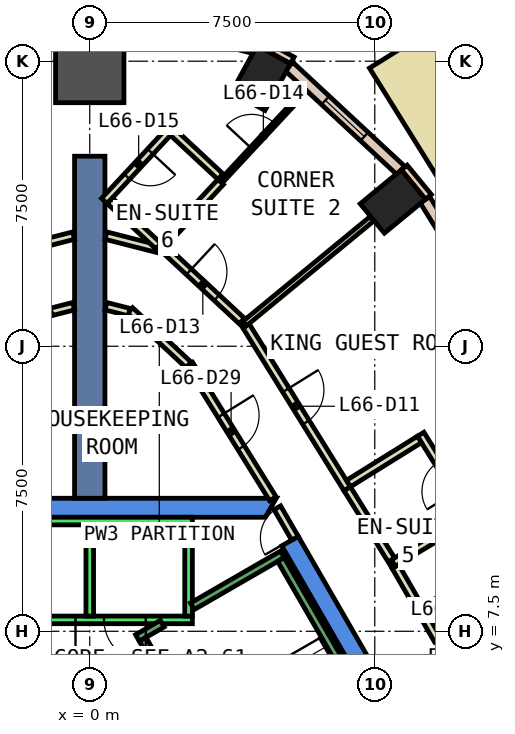
"""IFC4 building model, lengths in metres.
Left out: names, types, materials, properties, quantities, classifications, styles, units other than length and angle.
Written with IfcOpenShell. Run it as: python <this file> out.ifc"""

import sys

from ifc_helpers import new_model, si_unit, direction, frame, frame_2d, origin, origin_2d, place, context, subcontext, project, spatial, polyline, rectangle, outline, extrude, element, fill, save


model = new_model("IFC4")
c1 = context("Model", 3, precision=1e-05, world=origin(), true_north=direction((0.0, 1.0)))
c2 = subcontext(c1, "Body", "Model", "MODEL_VIEW")
j1 = project(units=[si_unit("LENGTHUNIT", "METRE"), si_unit("PLANEANGLEUNIT", "RADIAN")], contexts=[c1])
p1 = place(None, origin())
s1 = spatial("IfcSite", under=j1, at=p1, CompositionType="ELEMENT")
p2 = place(p1, origin())
s2 = spatial("IfcBuilding", under=s1, at=p2, CompositionType="ELEMENT")
p3 = place(p2, frame((0.0, 0.0, 286.4)))
s3 = spatial("IfcBuildingStorey", under=s2, at=p3, CompositionType="ELEMENT", Elevation=286.4)
for number, where, z_axis, x_axis in (
    (1, (7.975, 18.807, 0.0), (0.0, 0.0, 1.0), (-0.636, 0.772, 0.0)),
    (2, (4.507, 22.059, 0.0), (0.0, 0.0, 1.0), (-0.878, 0.479, 0.0)),
):
    element("IfcColumn", number, at=place(p3, frame(where, z_axis=z_axis, x_axis=x_axis)), inside=s3, PredefinedType="COLUMN", context=c2, shape_type="SweptSolid", body=[
        extrude(rectangle(XDim=1.0, YDim=1.4, at=origin_2d()), origin(), (0.0, 0.0, 1.0), 3.26),
    ])
p4 = place(p3, frame((0.0, 22.308, 0.0), z_axis=(0.0, 0.0, 1.0), x_axis=(0.0, 1.0, 0.0)))
e3 = element("IfcColumn", 3, at=p4, inside=s3, PredefinedType="COLUMN", context=c2, shape_type="SweptSolid", body=[
    extrude(rectangle(XDim=1.8, YDim=1.8, at=origin_2d()), origin(), (0.0, 0.0, 1.0), 3.26),
])
p5 = place(p3, frame((0.0, 0.0, -0.6)))
e4 = element("IfcWall", 4, at=p5, inside=s3, PredefinedType="SHEAR", context=c2, shape_type="SweptSolid", body=[
    extrude(outline(polyline([(5.486, 9.998), (5.053, 9.748), (9.238, 2.5), (9.815, 2.5), (5.486, 9.998)])), origin(), (0.0, 0.0, 1.0), 3.86),
])
p6 = place(p3, frame((0.0, 0.0, -0.6)))
e5 = element("IfcWall", 5, at=p6, inside=s3, PredefinedType="SHEAR", context=c2, shape_type="SweptSolid", body=[
    extrude(outline(polyline([(4.907, 11.0), (-4.907, 11.0), (-4.619, 10.5), (4.619, 10.5), (4.907, 11.0)])), origin(), (0.0, 0.0, 1.0), 3.86),
])
p7 = place(p3, frame((0.0, 11.0, -0.6), z_axis=(0.0, 0.0, 1.0), x_axis=(0.0, 1.0, 0.0)))
e6 = element("IfcWall", 6, at=p7, inside=s3, PredefinedType="SHEAR", context=c2, shape_type="SweptSolid", body=[
    extrude(rectangle(XDim=9.0, YDim=0.8, at=frame_2d((4.5, 0.0))), origin(), (0.0, 0.0, 1.0), 3.86),
])
for number, where, z_axis, x_axis in (
    (7, (5.329, 22.522, 0.0), (0.0, 0.0, 1.0), (-0.878, 0.479, 0.0)),
    (8, (8.911, 18.929, 0.0), (0.0, 0.0, 1.0), (-0.636, 0.772, 0.0)),
):
    element("IfcWall", number, at=place(p3, frame(where, z_axis=z_axis, x_axis=x_axis)), inside=s3, PredefinedType="STANDARD", context=c2, shape_type="SweptSolid", body=[
        extrude(rectangle(XDim=1.0, YDim=0.2, at=frame_2d((0.5, 0.0))), origin(), (0.0, 0.0, 1.0), 3.26),
    ])
p8 = place(p3, frame((12.659, 12.675, 0.0), z_axis=(0.0, 0.0, 1.0), x_axis=(-0.527762071678, 0.849392250788, 0.0)))
e9 = element("IfcWall", 9, at=p8, inside=s3, PredefinedType="STANDARD", context=c2, shape_type="SweptSolid", body=[
    extrude(rectangle(XDim=7.276, YDim=0.3, at=frame_2d((3.638, 0.0))), origin(), (0.0, 0.0, 1.0), 3.26),
])
p9 = place(p8, frame((0.719, 0.0, 0.9)))
e10 = element("IfcOpeningElement", 10, at=p9, cuts=e9, PredefinedType="OPENING", context=c2, shape_type="SweptSolid", body=[
    extrude(rectangle(XDim=2.2, YDim=2.0, at=frame_2d((1.1, 1.0))), frame((0.0, 0.16, 0.0), z_axis=(0.0, -1.0, 0.0), x_axis=(1.0, 0.0, 0.0)), (0.0, 0.0, 1.0), 0.32),
])
p10 = place(p8, frame((4.357, 0.0, 0.9)))
e11 = element("IfcOpeningElement", 11, at=p10, cuts=e9, PredefinedType="OPENING", context=c2, shape_type="SweptSolid", body=[
    extrude(rectangle(XDim=2.2, YDim=2.0, at=frame_2d((1.1, 1.0))), frame((0.0, 0.16, 0.0), z_axis=(0.0, -1.0, 0.0), x_axis=(1.0, 0.0, 0.0)), (0.0, 0.0, 1.0), 0.32),
])
p11 = place(p3, frame((8.184, 19.626, 0.0), z_axis=(0.0, 0.0, 1.0), x_axis=(-0.732397380344, 0.680877431896, 0.0)))
e12 = element("IfcWall", 12, at=p11, inside=s3, PredefinedType="STANDARD", context=c2, shape_type="SweptSolid", body=[
    extrude(rectangle(XDim=4.019, YDim=0.3, at=frame_2d((2.009, 0.0))), origin(), (0.0, 0.0, 1.0), 3.26),
])
p12 = place(p11, frame((1.309, 0.0, 0.9)))
e13 = element("IfcOpeningElement", 13, at=p12, cuts=e12, PredefinedType="OPENING", context=c2, shape_type="SweptSolid", body=[
    extrude(rectangle(XDim=1.4, YDim=2.0, at=frame_2d((0.7, 1.0))), frame((0.0, 0.16, 0.0), z_axis=(0.0, -1.0, 0.0), x_axis=(1.0, 0.0, 0.0)), (0.0, 0.0, 1.0), 0.32),
])
p13 = place(p3, frame((4.365, 22.84, 0.0), z_axis=(0.0, 0.0, 1.0), x_axis=(-0.968979290476, 0.247141932156, 0.0)))
e14 = element("IfcWall", 14, at=p13, inside=s3, PredefinedType="STANDARD", context=c2, shape_type="SweptSolid", body=[
    extrude(rectangle(XDim=3.577, YDim=0.3, at=frame_2d((1.789, 0.0))), origin(), (0.0, 0.0, 1.0), 3.26),
])
p14 = place(p13, frame((1.088, 0.0, 0.9)))
e15 = element("IfcOpeningElement", 15, at=p14, cuts=e14, PredefinedType="OPENING", context=c2, shape_type="SweptSolid", body=[
    extrude(rectangle(XDim=1.4, YDim=2.0, at=frame_2d((0.7, 1.0))), frame((0.0, 0.16, 0.0), z_axis=(0.0, -1.0, 0.0), x_axis=(1.0, 0.0, 0.0)), (0.0, 0.0, 1.0), 0.32),
])
p15 = place(p3, frame((-0.899, 23.724, 0.0), z_axis=(0.0, 0.0, 1.0), x_axis=(-0.968979290476, -0.247141932156, 0.0)))
e16 = element("IfcWall", 16, at=p15, inside=s3, PredefinedType="STANDARD", context=c2, shape_type="SweptSolid", body=[
    extrude(rectangle(XDim=3.577, YDim=0.3, at=frame_2d((1.789, 0.0))), origin(), (0.0, 0.0, 1.0), 3.26),
])
p16 = place(p15, frame((1.088, 0.0, 0.9)))
e17 = element("IfcOpeningElement", 17, at=p16, cuts=e16, PredefinedType="OPENING", context=c2, shape_type="SweptSolid", body=[
    extrude(rectangle(XDim=1.4, YDim=2.0, at=frame_2d((0.7, 1.0))), frame((0.0, 0.16, 0.0), z_axis=(0.0, -1.0, 0.0), x_axis=(1.0, 0.0, 0.0)), (0.0, 0.0, 1.0), 0.32),
])
p17 = place(p3, frame((10.704, 18.747, 0.0), z_axis=(0.0, 0.0, 1.0), x_axis=(-0.528631074262, 0.848851687472, 0.0)))
e18 = element("IfcWall", 18, at=p17, inside=s3, PredefinedType="STANDARD", context=c2, shape_type="SweptSolid", body=[
    extrude(rectangle(XDim=4.799, YDim=1.9, at=frame_2d((2.4, 0.0))), origin(), (0.0, 0.0, 1.0), 0.8),
])
p18 = place(p3, frame((2.62, 14.526, 0.0), z_axis=(0.0, 0.0, 1.0), x_axis=(0.527726136463, -0.84941457775, 0.0)))
e19 = element("IfcWall", 19, at=p18, inside=s3, PredefinedType="PARTITIONING", context=c2, shape_type="SweptSolid", body=[
    extrude(rectangle(XDim=4.165, YDim=0.2, at=frame_2d((2.083, 0.0))), origin(), (0.0, 0.0, 1.0), 2.4),
])
p19 = place(p18, frame((1.583, 0.0, 0.0)))
e20 = element("IfcOpeningElement", 20, at=p19, cuts=e19, PredefinedType="OPENING", context=c2, shape_type="SweptSolid", body=[
    extrude(rectangle(XDim=1.0, YDim=2.1, at=frame_2d((0.5, 1.05))), frame((0.0, 0.11, 0.0), z_axis=(0.0, -1.0, 0.0), x_axis=(1.0, 0.0, 0.0)), (0.0, 0.0, 1.0), 0.22),
])
p20 = place(p3, frame((2.6, 14.509, 0.0), z_axis=(0.0, 0.0, 1.0), x_axis=(-0.732355024595, 0.680922989735, 0.0)))
e21 = element("IfcWall", 21, at=p20, inside=s3, PredefinedType="PARTITIONING", context=c2, shape_type="SweptSolid", body=[
    extrude(rectangle(XDim=2.103, YDim=0.2, at=frame_2d((1.051, 0.0))), origin(), (0.0, 0.0, 1.0), 3.26),
])
for number, where, z_axis, x_axis in (
    (22, (1.036, 15.898, 0.0), (0.0, 0.0, 1.0), (-0.969, 0.247, 0.0)),
    (23, (-0.425, 16.054, 0.0), (0.0, 0.0, 1.0), (-0.969, -0.247, 0.0)),
):
    element("IfcWall", number, at=place(p3, frame(where, z_axis=z_axis, x_axis=x_axis)), inside=s3, PredefinedType="PARTITIONING", context=c2, shape_type="SweptSolid", body=[
        extrude(rectangle(XDim=0.63, YDim=0.2, at=frame_2d((0.315, 0.0))), origin(), (0.0, 0.0, 1.0), 3.26),
    ])
p21 = place(p3, frame((-1.06, 15.941, 0.0), z_axis=(0.0, 0.0, 1.0), x_axis=(-0.732355024595, -0.680922989735, 0.0)))
e24 = element("IfcWall", 24, at=p21, inside=s3, PredefinedType="PARTITIONING", context=c2, shape_type="SweptSolid", body=[
    extrude(rectangle(XDim=2.103, YDim=0.2, at=frame_2d((1.051, 0.0))), origin(), (0.0, 0.0, 1.0), 3.26),
])
p22 = place(p3, frame((8.039, 9.209, 0.0), z_axis=(0.0, 0.0, 1.0), x_axis=(0.500219543227, -0.865898613334, 0.0)))
e25 = element("IfcWall", 25, at=p22, inside=s3, PredefinedType="PARTITIONING", context=c2, shape_type="SweptSolid", body=[
    extrude(rectangle(XDim=1.261, YDim=0.2, at=frame_2d((0.631, 0.0))), origin(), (0.0, 0.0, 1.0), 3.26),
])
p23 = place(p3, frame((8.67, 8.117, 0.0), z_axis=(0.0, 0.0, 1.0), x_axis=(0.50002537861, -0.866010750942, 0.0)))
e26 = element("IfcWall", 26, at=p23, inside=s3, PredefinedType="PARTITIONING", context=c2, shape_type="SweptSolid", body=[
    extrude(rectangle(XDim=3.0, YDim=0.2, at=frame_2d((1.5, 0.0))), origin(), (0.0, 0.0, 1.0), 3.26),
])
p24 = place(p3, frame((4.022, 15.68, 0.0), z_axis=(0.0, 0.0, 1.0), x_axis=(0.527737948498, -0.849407239029, 0.0)))
e27 = element("IfcWall", 27, at=p24, inside=s3, PredefinedType="PARTITIONING", context=c2, shape_type="SweptSolid", body=[
    extrude(rectangle(XDim=5.217, YDim=0.2, at=frame_2d((2.608, 0.0))), origin(), (0.0, 0.0, 1.0), 3.26),
])
p25 = place(p24, frame((2.159, 0.0, 0.0)))
e28 = element("IfcOpeningElement", 28, at=p25, cuts=e27, PredefinedType="OPENING", context=c2, shape_type="SweptSolid", body=[
    extrude(rectangle(XDim=1.0, YDim=2.1, at=frame_2d((0.5, 1.05))), frame((0.0, 0.11, 0.0), z_axis=(0.0, -1.0, 0.0), x_axis=(1.0, 0.0, 0.0)), (0.0, 0.0, 1.0), 0.22),
])
p26 = place(p3, frame((6.775, 11.249, 0.0), z_axis=(0.0, 0.0, 1.0), x_axis=(0.527803270752, -0.849366650736, 0.0)))
e29 = element("IfcWall", 29, at=p26, inside=s3, PredefinedType="PARTITIONING", context=c2, shape_type="SweptSolid", body=[
    extrude(rectangle(XDim=2.401, YDim=0.2, at=frame_2d((1.2, 0.0))), origin(), (0.0, 0.0, 1.0), 3.26),
])
p27 = place(p3, frame((1.949, 17.572, 0.0), z_axis=(0.0, 0.0, 1.0), x_axis=(0.732331154554, -0.680948661846, 0.0)))
e30 = element("IfcWall", 30, at=p27, inside=s3, PredefinedType="PARTITIONING", context=c2, shape_type="SweptSolid", body=[
    extrude(rectangle(XDim=2.803, YDim=0.2, at=frame_2d((1.402, 0.0))), origin(), (0.0, 0.0, 1.0), 3.26),
])
p28 = place(p27, frame((0.901, 0.0, 0.0)))
e31 = element("IfcOpeningElement", 31, at=p28, cuts=e30, PredefinedType="OPENING", context=c2, shape_type="SweptSolid", body=[
    extrude(rectangle(XDim=1.0, YDim=2.1, at=frame_2d((0.5, 1.05))), frame((0.0, 0.11, 0.0), z_axis=(0.0, -1.0, 0.0), x_axis=(1.0, 0.0, 0.0)), (0.0, 0.0, 1.0), 0.22),
])
p29 = place(p3, frame((-1.926, 17.528, 0.0), z_axis=(0.0, 0.0, 1.0), x_axis=(0.968981980879, 0.247131383542, 0.0)))
e32 = element("IfcWall", 32, at=p29, inside=s3, PredefinedType="PARTITIONING", context=c2, shape_type="SweptSolid", body=[
    extrude(rectangle(XDim=1.549, YDim=0.2, at=frame_2d((0.774, 0.0))), origin(), (0.0, 0.0, 1.0), 3.26),
])
p30 = place(p3, frame((0.425, 17.911, 0.0), z_axis=(0.0, 0.0, 1.0), x_axis=(0.969051069597, -0.246860334023, 0.0)))
e33 = element("IfcWall", 33, at=p30, inside=s3, PredefinedType="PARTITIONING", context=c2, shape_type="SweptSolid", body=[
    extrude(rectangle(XDim=1.474, YDim=0.2, at=frame_2d((0.737, 0.0))), origin(), (0.0, 0.0, 1.0), 3.26),
])
p31 = place(p3, frame((10.885, 9.28, 0.0), z_axis=(0.0, 0.0, 1.0), x_axis=(-0.866022959057, -0.500004234368, 0.0)))
e34 = element("IfcWall", 34, at=p31, inside=s3, PredefinedType="PARTITIONING", context=c2, shape_type="SweptSolid", body=[
    extrude(rectangle(XDim=2.5, YDim=0.2, at=frame_2d((1.25, 0.0))), origin(), (0.0, 0.0, 1.0), 3.26),
])
p32 = place(p3, frame((7.989, 9.295, 0.0), z_axis=(0.0, 0.0, 1.0), x_axis=(0.857801856135, 0.513980520654, 0.0)))
e35 = element("IfcWall", 35, at=p32, inside=s3, PredefinedType="PARTITIONING", context=c2, shape_type="SweptSolid", body=[
    extrude(rectangle(XDim=2.3, YDim=0.2, at=frame_2d((1.15, 0.0))), origin(), (0.0, 0.0, 1.0), 3.26),
])
p33 = place(p3, frame((10.1, 10.443, 0.0), z_axis=(0.0, 0.0, 1.0), x_axis=(-0.527510239672, 0.849548672555, 0.0)))
e36 = element("IfcWall", 36, at=p33, inside=s3, PredefinedType="PARTITIONING", context=c2, shape_type="SweptSolid", body=[
    extrude(rectangle(XDim=2.639, YDim=0.2, at=frame_2d((1.319, 0.0))), origin(), (0.0, 0.0, 1.0), 3.26),
])
p34 = place(p33, frame((0.869, 0.0, 0.0)))
e37 = element("IfcOpeningElement", 37, at=p34, cuts=e36, PredefinedType="OPENING", context=c2, shape_type="SweptSolid", body=[
    extrude(rectangle(XDim=0.9, YDim=2.1, at=frame_2d((0.45, 1.05))), frame((0.0, 0.11, 0.0), z_axis=(0.0, -1.0, 0.0), x_axis=(1.0, 0.0, 0.0)), (0.0, 0.0, 1.0), 0.22),
])
p35 = place(p3, frame((8.676, 12.548, 0.0), z_axis=(0.0, 0.0, 1.0), x_axis=(-0.849286670427, -0.527931957202, 0.0)))
e38 = element("IfcWall", 38, at=p35, inside=s3, PredefinedType="PARTITIONING", context=c2, shape_type="SweptSolid", body=[
    extrude(rectangle(XDim=2.199, YDim=0.2, at=frame_2d((1.1, 0.0))), origin(), (0.0, 0.0, 1.0), 3.26),
])
p36 = place(p3, frame((4.075, 15.595, 0.0), z_axis=(0.0, 0.0, 1.0), x_axis=(0.771899326406, 0.635744783616, 0.0)))
e39 = element("IfcWall", 39, at=p36, inside=s3, PredefinedType="PARTITIONING", context=c2, shape_type="SweptSolid", body=[
    extrude(rectangle(XDim=4.332, YDim=0.15, at=frame_2d((2.166, 0.0))), origin(), (0.0, 0.0, 1.0), 3.26),
])
p37 = place(p3, frame((3.444, 19.322, 0.0), z_axis=(0.0, 0.0, 1.0), x_axis=(0.68085394361, 0.732419215662, 0.0)))
e40 = element("IfcWall", 40, at=p37, inside=s3, PredefinedType="PARTITIONING", context=c2, shape_type="SweptSolid", body=[
    extrude(rectangle(XDim=3.3, YDim=0.1, at=frame_2d((1.65, 0.0))), origin(), (0.0, 0.0, 1.0), 3.26),
])
p38 = place(p37, frame((1.2, 0.0, 0.0)))
e41 = element("IfcOpeningElement", 41, at=p38, cuts=e40, PredefinedType="OPENING", context=c2, shape_type="SweptSolid", body=[
    extrude(rectangle(XDim=0.9, YDim=2.1, at=frame_2d((0.45, 1.05))), frame((0.0, 0.06, 0.0), z_axis=(0.0, -1.0, 0.0), x_axis=(1.0, 0.0, 0.0)), (0.0, 0.0, 1.0), 0.12),
])
p39 = place(p3, frame((1.776, 17.528, 0.0), z_axis=(0.0, 0.0, 1.0), x_axis=(0.680978439741, 0.732303464834, 0.0)))
e42 = element("IfcWall", 42, at=p39, inside=s3, PredefinedType="PARTITIONING", context=c2, shape_type="SweptSolid", body=[
    extrude(rectangle(XDim=2.45, YDim=0.2, at=frame_2d((1.225, 0.0))), origin(), (0.0, 0.0, 1.0), 3.26),
])
p40 = place(p3, frame((3.439, 19.464, 0.0), z_axis=(0.0, 0.0, 1.0), x_axis=(-0.732491549411, 0.68077612329, 0.0)))
e43 = element("IfcWall", 43, at=p40, inside=s3, PredefinedType="PARTITIONING", context=c2, shape_type="SweptSolid", body=[
    extrude(rectangle(XDim=1.699, YDim=0.2, at=frame_2d((0.85, 0.0))), origin(), (0.0, 0.0, 1.0), 3.26),
])
p41 = place(p3, frame((2.189, 20.763, 0.0), z_axis=(0.0, 0.0, 1.0), x_axis=(-0.680987945319, -0.73229462536, 0.0)))
e44 = element("IfcWall", 44, at=p41, inside=s3, PredefinedType="PARTITIONING", context=c2, shape_type="SweptSolid", body=[
    extrude(rectangle(XDim=2.65, YDim=0.2, at=frame_2d((1.325, 0.0))), origin(), (0.0, 0.0, 1.0), 3.26),
])
p42 = place(p41, frame((0.875, 0.0, 0.0)))
e45 = element("IfcOpeningElement", 45, at=p42, cuts=e44, PredefinedType="OPENING", context=c2, shape_type="SweptSolid", body=[
    extrude(rectangle(XDim=0.9, YDim=2.1, at=frame_2d((0.45, 1.05))), frame((0.0, 0.11, 0.0), z_axis=(0.0, -1.0, 0.0), x_axis=(1.0, 0.0, 0.0)), (0.0, 0.0, 1.0), 0.22),
])
p43 = place(p3, frame((0.526, 18.827, 0.0), z_axis=(0.0, 0.0, 1.0), x_axis=(0.732112296378, -0.681183958628, 0.0)))
e46 = element("IfcWall", 46, at=p43, inside=s3, PredefinedType="PARTITIONING", context=c2, shape_type="SweptSolid", body=[
    extrude(rectangle(XDim=1.75, YDim=0.2, at=frame_2d((0.875, 0.0))), origin(), (0.0, 0.0, 1.0), 3.26),
])
p44 = place(p3, frame((5.399, 9.948, 0.0), z_axis=(0.0, 0.0, 1.0), x_axis=(-0.499882215713, 0.866093395895, 0.0)))
e47 = element("IfcWall", 47, at=p44, inside=s3, PredefinedType="PARTITIONING", context=c2, shape_type="SweptSolid", body=[
    extrude(rectangle(XDim=0.926, YDim=0.2, at=frame_2d((0.463, 0.0))), origin(), (0.0, 0.0, 1.0), 2.4),
])
p45 = place(p44, frame((0.017, 0.0, 0.0)))
e48 = element("IfcOpeningElement", 48, at=p45, cuts=e47, PredefinedType="OPENING", context=c2, shape_type="SweptSolid", body=[
    extrude(rectangle(XDim=0.9, YDim=2.1, at=frame_2d((0.45, 1.05))), frame((0.0, 0.11, 0.0), z_axis=(0.0, -1.0, 0.0), x_axis=(1.0, 0.0, 0.0)), (0.0, 0.0, 1.0), 0.22),
])
p46 = place(p3, frame((2.7, 7.8, 0.0), z_axis=(0.0, 0.0, 1.0), x_axis=(-1.0, 0.0, 0.0)))
e49 = element("IfcWall", 49, at=p46, inside=s3, PredefinedType="STANDARD", context=c2, shape_type="SweptSolid", body=[
    extrude(rectangle(XDim=5.4, YDim=0.2, at=frame_2d((2.7, 0.0))), origin(), (0.0, 0.0, 1.0), 3.26),
])
p47 = place(p46, frame((1.225, 0.0, 0.0)))
e50 = element("IfcOpeningElement", 50, at=p47, cuts=e49, PredefinedType="OPENING", context=c2, shape_type="SweptSolid", body=[
    extrude(rectangle(XDim=1.1, YDim=2.1, at=frame_2d((0.55, 1.05))), frame((0.0, 0.11, 0.0), z_axis=(0.0, -1.0, 0.0), x_axis=(1.0, 0.0, 0.0)), (0.0, 0.0, 1.0), 0.22),
])
p48 = place(p46, frame((3.075, 0.0, 0.0)))
e51 = element("IfcOpeningElement", 51, at=p48, cuts=e49, PredefinedType="OPENING", context=c2, shape_type="SweptSolid", body=[
    extrude(rectangle(XDim=1.1, YDim=2.1, at=frame_2d((0.55, 1.05))), frame((0.0, 0.11, 0.0), z_axis=(0.0, -1.0, 0.0), x_axis=(1.0, 0.0, 0.0)), (0.0, 0.0, 1.0), 0.22),
])
p49 = place(p3, frame((2.7, 10.4, 0.0), z_axis=(0.0, 0.0, 1.0), x_axis=(-1.0, 0.0, 0.0)))
e52 = element("IfcWall", 52, at=p49, inside=s3, PredefinedType="STANDARD", context=c2, shape_type="SweptSolid", body=[
    extrude(rectangle(XDim=5.4, YDim=0.2, at=frame_2d((2.7, 0.0))), origin(), (0.0, 0.0, 1.0), 3.26),
])
for number, where, z_axis, x_axis in (
    (53, (2.6, 7.9, 0.0), (0.0, 0.0, 1.0), (0.0, 1.0, 0.0)),
    (54, (0.0, 7.9, 0.0), (0.0, 0.0, 1.0), (0.0, 1.0, 0.0)),
):
    element("IfcWall", number, at=place(p3, frame(where, z_axis=z_axis, x_axis=x_axis)), inside=s3, PredefinedType="STANDARD", context=c2, shape_type="SweptSolid", body=[
        extrude(rectangle(XDim=2.4, YDim=0.2, at=frame_2d((1.2, 0.0))), origin(), (0.0, 0.0, 1.0), 3.26),
    ])
p50 = place(p3, frame((2.7, 8.158, 0.0), z_axis=(0.0, 0.0, 1.0), x_axis=(0.86611865017, 0.499838457731, 0.0)))
e55 = element("IfcWall", 55, at=p50, inside=s3, PredefinedType="STANDARD", context=c2, shape_type="SweptSolid", body=[
    extrude(rectangle(XDim=2.733, YDim=0.2, at=frame_2d((1.366, 0.0))), origin(), (0.0, 0.0, 1.0), 3.26),
])
p51 = place(p3, frame((1.256, 7.324, 0.0), z_axis=(0.0, 0.0, 1.0), x_axis=(0.865915093549, 0.500191014278, 0.0)))
e56 = element("IfcWall", 56, at=p51, inside=s3, PredefinedType="STANDARD", context=c2, shape_type="SweptSolid", body=[
    extrude(rectangle(XDim=0.752, YDim=0.2, at=frame_2d((0.376, 0.0))), origin(), (0.0, 0.0, 1.0), 3.26),
])
p52 = place(p3, frame((4.843, 1.312, 0.0), z_axis=(0.0, 0.0, 1.0), x_axis=(-0.499963383562, 0.866046543262, 0.0)))
e57 = element("IfcWall", 57, at=p52, inside=s3, PredefinedType="STANDARD", context=c2, shape_type="SweptSolid", body=[
    extrude(rectangle(XDim=6.9, YDim=0.2, at=frame_2d((3.45, 0.0))), origin(), (0.0, 0.0, 1.0), 3.26),
])
p53 = place(p52, frame((0.45, 0.0, 0.0)))
e58 = element("IfcOpeningElement", 58, at=p53, cuts=e57, PredefinedType="OPENING", context=c2, shape_type="SweptSolid", body=[
    extrude(rectangle(XDim=1.1, YDim=2.2, at=frame_2d((0.55, 1.1))), frame((0.0, 0.11, 0.0), z_axis=(0.0, -1.0, 0.0), x_axis=(1.0, 0.0, 0.0)), (0.0, 0.0, 1.0), 0.22),
])
p54 = place(p3, frame((8.48, 3.412, 0.0), z_axis=(0.0, 0.0, 1.0), x_axis=(-0.499978703459, 0.866037698999, 0.0)))
e59 = element("IfcWall", 59, at=p54, inside=s3, PredefinedType="STANDARD", context=c2, shape_type="SweptSolid", body=[
    extrude(rectangle(XDim=6.9, YDim=0.2, at=frame_2d((3.45, 0.0))), origin(), (0.0, 0.0, 1.0), 3.26),
])
p55 = place(p12, origin())
e60 = element("IfcWindow", 60, at=p55, inside=s3, PartitioningType="SINGLE_PANEL", PredefinedType="WINDOW", context=c2, shape_type="SweptSolid", body=[
    extrude(rectangle(XDim=1.4, YDim=2.0, at=frame_2d((0.7, 1.0))), frame((0.0, 0.03, 0.0), z_axis=(0.0, -1.0, 0.0), x_axis=(1.0, 0.0, 0.0)), (0.0, 0.0, 1.0), 0.06),
])
fill(e13, e60)
p56 = place(p25, origin())
e61 = element("IfcDoor", 61, at=p56, inside=s3, OperationType="SINGLE_SWING_LEFT", PredefinedType="DOOR", context=c2, shape_type="SweptSolid", body=[
    extrude(rectangle(XDim=1.0, YDim=2.1, at=frame_2d((0.5, 1.05))), frame((0.0, 0.025, 0.0), z_axis=(0.0, -1.0, 0.0), x_axis=(1.0, 0.0, 0.0)), (0.0, 0.0, 1.0), 0.05),
])
fill(e28, e61)
p57 = place(p28, origin())
e62 = element("IfcDoor", 62, at=p57, inside=s3, OperationType="SINGLE_SWING_LEFT", PredefinedType="DOOR", context=c2, shape_type="SweptSolid", body=[
    extrude(rectangle(XDim=1.0, YDim=2.1, at=frame_2d((0.5, 1.05))), frame((0.0, 0.025, 0.0), z_axis=(0.0, -1.0, 0.0), x_axis=(1.0, 0.0, 0.0)), (0.0, 0.0, 1.0), 0.05),
])
fill(e31, e62)
p58 = place(p38, origin())
e63 = element("IfcDoor", 63, at=p58, inside=s3, OperationType="SINGLE_SWING_LEFT", PredefinedType="DOOR", context=c2, shape_type="SweptSolid", body=[
    extrude(rectangle(XDim=0.9, YDim=2.1, at=frame_2d((0.45, 1.05))), frame((0.0, 0.025, 0.0), z_axis=(0.0, -1.0, 0.0), x_axis=(1.0, 0.0, 0.0)), (0.0, 0.0, 1.0), 0.05),
])
fill(e41, e63)
p59 = place(p42, origin())
e64 = element("IfcDoor", 64, at=p59, inside=s3, OperationType="SINGLE_SWING_LEFT", PredefinedType="DOOR", context=c2, shape_type="SweptSolid", body=[
    extrude(rectangle(XDim=0.9, YDim=2.1, at=frame_2d((0.45, 1.05))), frame((0.0, 0.025, 0.0), z_axis=(0.0, -1.0, 0.0), x_axis=(1.0, 0.0, 0.0)), (0.0, 0.0, 1.0), 0.05),
])
fill(e45, e64)
p60 = place(p19, origin())
e65 = element("IfcDoor", 65, at=p60, inside=s3, OperationType="SINGLE_SWING_RIGHT", PredefinedType="DOOR", context=c2, shape_type="SweptSolid", body=[
    extrude(rectangle(XDim=1.0, YDim=2.1, at=frame_2d((0.5, 1.05))), frame((0.0, 0.025, 0.0), z_axis=(0.0, -1.0, 0.0), x_axis=(1.0, 0.0, 0.0)), (0.0, 0.0, 1.0), 0.05),
])
fill(e20, e65)
p61 = place(p45, origin())
e66 = element("IfcDoor", 66, at=p61, inside=s3, OperationType="SINGLE_SWING_LEFT", PredefinedType="DOOR", context=c2, shape_type="SweptSolid", body=[
    extrude(rectangle(XDim=0.9, YDim=2.1, at=frame_2d((0.45, 1.05))), frame((0.0, 0.025, 0.0), z_axis=(0.0, -1.0, 0.0), x_axis=(1.0, 0.0, 0.0)), (0.0, 0.0, 1.0), 0.05),
])
fill(e48, e66)
p62 = place(p47, origin())
e67 = element("IfcDoor", 67, at=p62, inside=s3, OperationType="SLIDING_TO_LEFT", PredefinedType="DOOR", context=c2, shape_type="SweptSolid", body=[
    extrude(rectangle(XDim=1.1, YDim=2.1, at=frame_2d((0.55, 1.05))), frame((0.0, 0.025, 0.0), z_axis=(0.0, -1.0, 0.0), x_axis=(1.0, 0.0, 0.0)), (0.0, 0.0, 1.0), 0.05),
])
fill(e50, e67)
p63 = place(p48, origin())
e68 = element("IfcDoor", 68, at=p63, inside=s3, OperationType="SLIDING_TO_LEFT", PredefinedType="DOOR", context=c2, shape_type="SweptSolid", body=[
    extrude(rectangle(XDim=1.1, YDim=2.1, at=frame_2d((0.55, 1.05))), frame((0.0, 0.025, 0.0), z_axis=(0.0, -1.0, 0.0), x_axis=(1.0, 0.0, 0.0)), (0.0, 0.0, 1.0), 0.05),
])
fill(e51, e68)
save(model, sys.argv[1])
